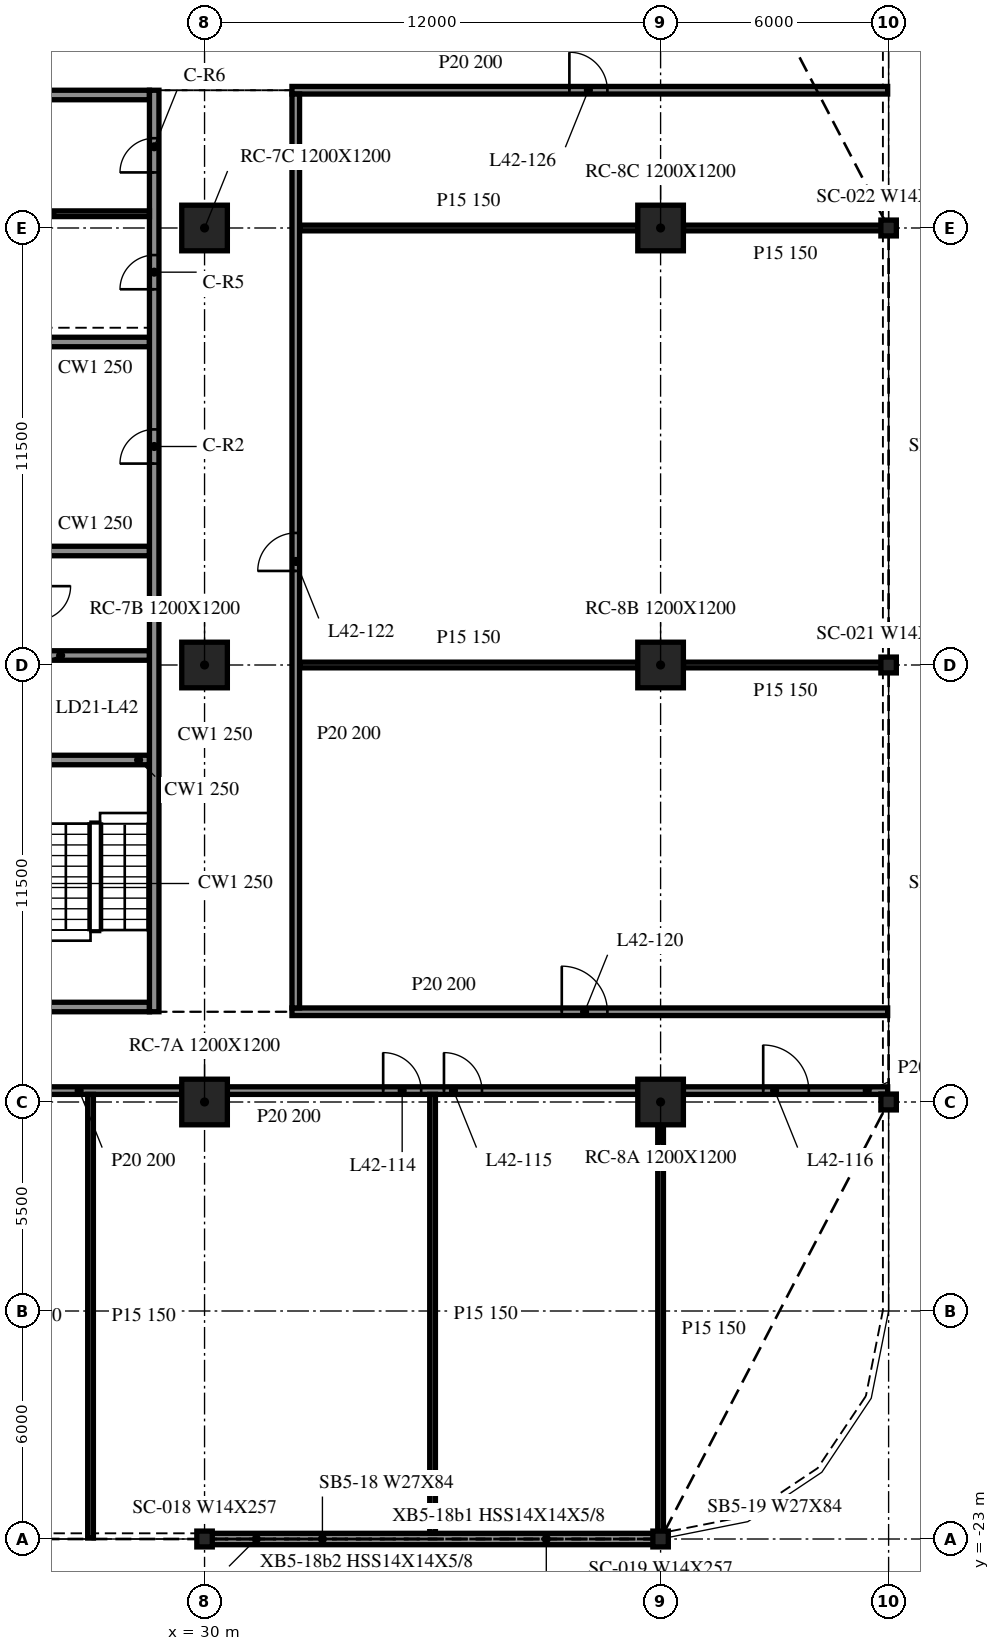
"""IFC4 building model, lengths in metres.
Left out: names, types, materials, properties, quantities, classifications, styles, units other than length and angle.
Written with IfcOpenShell. Run it as: python <this file> out.ifc"""

import sys

from ifc_helpers import new_model, si_unit, direction, frame, frame_2d, origin, origin_2d, place, context, subcontext, project, spatial, rectangle, i_section, extrude, element, fill, save


model = new_model("IFC4")
c1 = context("Model", 3, precision=1e-05, world=origin(), true_north=direction((0.0, 1.0)))
c2 = subcontext(c1, "Body", "Model", "MODEL_VIEW")
j1 = project(units=[si_unit("LENGTHUNIT", "METRE"), si_unit("PLANEANGLEUNIT", "RADIAN")], contexts=[c1])
p1 = place(None, origin())
s1 = spatial("IfcSite", under=j1, at=p1, CompositionType="ELEMENT")
p2 = place(p1, origin())
s2 = spatial("IfcBuilding", under=s1, at=p2, CompositionType="ELEMENT")
p3 = place(p2, frame((0.0, 0.0, 178.2)))
s3 = spatial("IfcBuildingStorey", under=s2, at=p3, CompositionType="ELEMENT", Elevation=178.2)
for number, where, z_axis, x_axis in (
    (1, (30.0, -11.5, -0.34), (0.0, 0.0, 1.0), (1.0, 0.0, 0.0)),
    (2, (30.0, 0.0, -0.34), (0.0, 0.0, 1.0), (1.0, 0.0, 0.0)),
    (3, (30.0, 11.5, -0.34), (0.0, 0.0, 1.0), (1.0, 0.0, 0.0)),
    (4, (42.0, -11.5, -0.34), (0.0, 0.0, 1.0), (1.0, 0.0, 0.0)),
    (5, (42.0, 0.0, -0.34), (0.0, 0.0, 1.0), (1.0, 0.0, 0.0)),
    (6, (42.0, 11.5, -0.34), (0.0, 0.0, 1.0), (1.0, 0.0, 0.0)),
):
    element("IfcColumn", number, at=place(p3, frame(where, z_axis=z_axis, x_axis=x_axis)), inside=s3, PredefinedType="COLUMN", context=c2, shape_type="SweptSolid", body=[
        extrude(rectangle(XDim=1.2, YDim=1.2, at=origin_2d()), origin(), (0.0, 0.0, 1.0), 3.8),
    ])
for number, where, z_axis, x_axis in (
    (7, (30.0, -23.0, -0.34), (0.0, 0.0, 1.0), (1.0, 0.0, 0.0)),
    (8, (42.0, -23.0, -0.34), (0.0, 0.0, 1.0), (1.0, 0.0, 0.0)),
    (9, (48.0, -11.5, -0.34), (0.0, 0.0, 1.0), (1.0, 0.0, 0.0)),
    (10, (48.0, 0.0, -0.34), (0.0, 0.0, 1.0), (1.0, 0.0, 0.0)),
    (11, (48.0, 11.5, -0.34), (0.0, 0.0, 1.0), (1.0, 0.0, 0.0)),
):
    element("IfcColumn", number, at=place(p3, frame(where, z_axis=z_axis, x_axis=x_axis)), inside=s3, PredefinedType="COLUMN", context=c2, shape_type="SweptSolid", body=[
        extrude(i_section(OverallWidth=0.406, OverallDepth=0.417, WebThickness=0.03, FlangeThickness=0.048, at=origin_2d()), origin(), (0.0, 0.0, 1.0), 3.8),
    ])
p4 = place(p3, frame((30.015, -23.0, 0.0), z_axis=(0.0, 0.0, 1.0), x_axis=(1.0, 0.0, 0.0)))
e12 = element("IfcWall", 12, at=p4, inside=s3, PredefinedType="NOTDEFINED", context=c2, shape_type="SweptSolid", body=[
    extrude(rectangle(XDim=11.97, YDim=0.3, at=frame_2d((5.985, 0.0))), origin(), (0.0, 0.0, 1.0), 2.782),
])
p5 = place(p3, frame((28.675, -9.125, 0.0), z_axis=(0.0, 0.0, 1.0), x_axis=(0.0, 1.0, 0.0)))
e13 = element("IfcWall", 13, at=p5, inside=s3, PredefinedType="SOLIDWALL", context=c2, shape_type="SweptSolid", body=[
    extrude(rectangle(XDim=24.25, YDim=0.25, at=frame_2d((12.125, 0.0))), origin(), (0.0, 0.0, 1.0), 3.46),
])
p6 = place(p5, frame((14.425, 0.0, 0.0)))
e14 = element("IfcOpeningElement", 14, at=p6, cuts=e13, PredefinedType="OPENING", context=c2, shape_type="SweptSolid", body=[
    extrude(rectangle(XDim=0.9, YDim=2.1, at=frame_2d((0.45, 1.05))), frame((0.0, 0.135, 0.0), z_axis=(0.0, -1.0, 0.0), x_axis=(1.0, 0.0, 0.0)), (0.0, 0.0, 1.0), 0.27),
])
p7 = place(p5, frame((19.012, 0.0, 0.0)))
e15 = element("IfcOpeningElement", 15, at=p7, cuts=e13, PredefinedType="OPENING", context=c2, shape_type="SweptSolid", body=[
    extrude(rectangle(XDim=0.9, YDim=2.1, at=frame_2d((0.45, 1.05))), frame((0.0, 0.135, 0.0), z_axis=(0.0, -1.0, 0.0), x_axis=(1.0, 0.0, 0.0)), (0.0, 0.0, 1.0), 0.27),
])
p8 = place(p5, frame((22.087, 0.0, 0.0)))
e16 = element("IfcOpeningElement", 16, at=p8, cuts=e13, PredefinedType="OPENING", context=c2, shape_type="SweptSolid", body=[
    extrude(rectangle(XDim=0.9, YDim=2.1, at=frame_2d((0.45, 1.05))), frame((0.0, 0.135, 0.0), z_axis=(0.0, -1.0, 0.0), x_axis=(1.0, 0.0, 0.0)), (0.0, 0.0, 1.0), 0.27),
])
p9 = place(p3, frame((28.55, -9.0, 0.0), z_axis=(0.0, 0.0, 1.0), x_axis=(-1.0, 0.0, 0.0)))
e17 = element("IfcWall", 17, at=p9, inside=s3, PredefinedType="SOLIDWALL", context=c2, shape_type="SweptSolid", body=[
    extrude(rectangle(XDim=9.1, YDim=0.25, at=frame_2d((4.55, 0.0))), origin(), (0.0, 0.0, 1.0), 3.46),
])
p10 = place(p9, frame((3.65, 0.0, 0.0)))
e18 = element("IfcOpeningElement", 18, at=p10, cuts=e17, PredefinedType="OPENING", context=c2, shape_type="SweptSolid", body=[
    extrude(rectangle(XDim=1.8, YDim=2.1, at=frame_2d((0.9, 1.05))), frame((0.0, 0.135, 0.0), z_axis=(0.0, -1.0, 0.0), x_axis=(1.0, 0.0, 0.0)), (0.0, 0.0, 1.0), 0.27),
])
p11 = place(p3, frame((19.45, 15.0, 0.0), z_axis=(0.0, 0.0, 1.0), x_axis=(1.0, 0.0, 0.0)))
e19 = element("IfcWall", 19, at=p11, inside=s3, PredefinedType="SOLIDWALL", context=c2, shape_type="SweptSolid", body=[
    extrude(rectangle(XDim=9.1, YDim=0.25, at=frame_2d((4.55, 0.0))), origin(), (0.0, 0.0, 1.0), 3.46),
])
p12 = place(p11, frame((3.65, 0.0, 0.0)))
e20 = element("IfcOpeningElement", 20, at=p12, cuts=e19, PredefinedType="OPENING", context=c2, shape_type="SweptSolid", body=[
    extrude(rectangle(XDim=1.8, YDim=2.1, at=frame_2d((0.9, 1.05))), frame((0.0, 0.135, 0.0), z_axis=(0.0, -1.0, 0.0), x_axis=(1.0, 0.0, 0.0)), (0.0, 0.0, 1.0), 0.27),
])
for number, where, z_axis, x_axis in (
    (21, (25.7, -2.5, 0.0), (0.0, 0.0, 1.0), (1.0, 0.0, 0.0)),
    (22, (25.7, 0.25, 0.0), (0.0, 0.0, 1.0), (1.0, 0.0, 0.0)),
    (23, (25.7, 3.0, 0.0), (0.0, 0.0, 1.0), (1.0, 0.0, 0.0)),
    (24, (25.7, 8.5, 0.0), (0.0, 0.0, 1.0), (1.0, 0.0, 0.0)),
):
    element("IfcWall", number, at=place(p3, frame(where, z_axis=z_axis, x_axis=x_axis)), inside=s3, PredefinedType="SOLIDWALL", context=c2, shape_type="SweptSolid", body=[
        extrude(rectangle(XDim=2.85, YDim=0.25, at=frame_2d((1.425, 0.0))), origin(), (0.0, 0.0, 1.0), 3.46),
    ])
p13 = place(p3, frame((25.7, 11.875, 0.0), z_axis=(0.0, 0.0, 1.0), x_axis=(1.0, 0.0, 0.0)))
e25 = element("IfcWall", 25, at=p13, inside=s3, PredefinedType="PARTITIONING", context=c2, shape_type="SweptSolid", body=[
    extrude(rectangle(XDim=2.85, YDim=0.15, at=frame_2d((1.425, 0.0))), origin(), (0.0, 0.0, 1.0), 3.46),
])
p14 = place(p3, frame((18.6, -11.2, 0.0), z_axis=(0.0, 0.0, 1.0), x_axis=(1.0, 0.0, 0.0)))
e26 = element("IfcWall", 26, at=p14, inside=s3, PredefinedType="PARTITIONING", context=c2, shape_type="SweptSolid", body=[
    extrude(rectangle(XDim=10.8, YDim=0.2, at=frame_2d((5.4, 0.0))), origin(), (0.0, 0.0, 1.0), 3.46),
])
p15 = place(p14, frame((3.9, 0.0, 0.0)))
e27 = element("IfcOpeningElement", 27, at=p15, cuts=e26, PredefinedType="OPENING", context=c2, shape_type="SweptSolid", body=[
    extrude(rectangle(XDim=1.2, YDim=2.1, at=frame_2d((0.6, 1.05))), frame((0.0, 0.11, 0.0), z_axis=(0.0, -1.0, 0.0), x_axis=(1.0, 0.0, 0.0)), (0.0, 0.0, 1.0), 0.22),
])
p16 = place(p14, frame((5.7, 0.0, 0.0)))
e28 = element("IfcOpeningElement", 28, at=p16, cuts=e26, PredefinedType="OPENING", context=c2, shape_type="SweptSolid", body=[
    extrude(rectangle(XDim=1.0, YDim=2.1, at=frame_2d((0.5, 1.05))), frame((0.0, 0.11, 0.0), z_axis=(0.0, -1.0, 0.0), x_axis=(1.0, 0.0, 0.0)), (0.0, 0.0, 1.0), 0.22),
])
p17 = place(p3, frame((30.6, -11.2, 0.0), z_axis=(0.0, 0.0, 1.0), x_axis=(1.0, 0.0, 0.0)))
e29 = element("IfcWall", 29, at=p17, inside=s3, PredefinedType="PARTITIONING", context=c2, shape_type="SweptSolid", body=[
    extrude(rectangle(XDim=10.8, YDim=0.2, at=frame_2d((5.4, 0.0))), origin(), (0.0, 0.0, 1.0), 3.46),
])
p18 = place(p17, frame((4.1, 0.0, 0.0)))
e30 = element("IfcOpeningElement", 30, at=p18, cuts=e29, PredefinedType="OPENING", context=c2, shape_type="SweptSolid", body=[
    extrude(rectangle(XDim=1.0, YDim=2.1, at=frame_2d((0.5, 1.05))), frame((0.0, 0.11, 0.0), z_axis=(0.0, -1.0, 0.0), x_axis=(1.0, 0.0, 0.0)), (0.0, 0.0, 1.0), 0.22),
])
p19 = place(p17, frame((5.7, 0.0, 0.0)))
e31 = element("IfcOpeningElement", 31, at=p19, cuts=e29, PredefinedType="OPENING", context=c2, shape_type="SweptSolid", body=[
    extrude(rectangle(XDim=1.0, YDim=2.1, at=frame_2d((0.5, 1.05))), frame((0.0, 0.11, 0.0), z_axis=(0.0, -1.0, 0.0), x_axis=(1.0, 0.0, 0.0)), (0.0, 0.0, 1.0), 0.22),
])
p20 = place(p3, frame((42.6, -11.2, 0.0), z_axis=(0.0, 0.0, 1.0), x_axis=(1.0, 0.0, 0.0)))
e32 = element("IfcWall", 32, at=p20, inside=s3, PredefinedType="PARTITIONING", context=c2, shape_type="SweptSolid", body=[
    extrude(rectangle(XDim=5.375, YDim=0.2, at=frame_2d((2.688, 0.0))), origin(), (0.0, 0.0, 1.0), 3.46),
])
p21 = place(p20, frame((2.1, 0.0, 0.0)))
e33 = element("IfcOpeningElement", 33, at=p21, cuts=e32, PredefinedType="OPENING", context=c2, shape_type="SweptSolid", body=[
    extrude(rectangle(XDim=1.2, YDim=2.1, at=frame_2d((0.6, 1.05))), frame((0.0, 0.11, 0.0), z_axis=(0.0, -1.0, 0.0), x_axis=(1.0, 0.0, 0.0)), (0.0, 0.0, 1.0), 0.22),
])
p22 = place(p3, frame((32.3, -9.125, 0.0), z_axis=(0.0, 0.0, 1.0), x_axis=(1.0, 0.0, 0.0)))
e34 = element("IfcWall", 34, at=p22, inside=s3, PredefinedType="PARTITIONING", context=c2, shape_type="SweptSolid", body=[
    extrude(rectangle(XDim=15.675, YDim=0.2, at=frame_2d((7.837, 0.0))), origin(), (0.0, 0.0, 1.0), 3.46),
])
p23 = place(p22, frame((7.1, 0.0, 0.0)))
e35 = element("IfcOpeningElement", 35, at=p23, cuts=e34, PredefinedType="OPENING", context=c2, shape_type="SweptSolid", body=[
    extrude(rectangle(XDim=1.2, YDim=2.1, at=frame_2d((0.6, 1.05))), frame((0.0, 0.11, 0.0), z_axis=(0.0, -1.0, 0.0), x_axis=(1.0, 0.0, 0.0)), (0.0, 0.0, 1.0), 0.22),
])
p24 = place(p3, frame((32.5, 0.0, 0.0), z_axis=(0.0, 0.0, 1.0), x_axis=(1.0, 0.0, 0.0)))
e36 = element("IfcWall", 36, at=p24, inside=s3, PredefinedType="PARTITIONING", context=c2, shape_type="SweptSolid", body=[
    extrude(rectangle(XDim=8.9, YDim=0.15, at=frame_2d((4.45, 0.0))), origin(), (0.0, 0.0, 1.0), 3.46),
])
p25 = place(p3, frame((42.6, 0.0, 0.0), z_axis=(0.0, 0.0, 1.0), x_axis=(1.0, 0.0, 0.0)))
e37 = element("IfcWall", 37, at=p25, inside=s3, PredefinedType="PARTITIONING", context=c2, shape_type="SweptSolid", body=[
    extrude(rectangle(XDim=5.375, YDim=0.15, at=frame_2d((2.688, 0.0))), origin(), (0.0, 0.0, 1.0), 3.46),
])
p26 = place(p3, frame((32.5, 11.5, 0.0), z_axis=(0.0, 0.0, 1.0), x_axis=(1.0, 0.0, 0.0)))
e38 = element("IfcWall", 38, at=p26, inside=s3, PredefinedType="PARTITIONING", context=c2, shape_type="SweptSolid", body=[
    extrude(rectangle(XDim=8.9, YDim=0.15, at=frame_2d((4.45, 0.0))), origin(), (0.0, 0.0, 1.0), 3.46),
])
p27 = place(p3, frame((42.6, 11.5, 0.0), z_axis=(0.0, 0.0, 1.0), x_axis=(1.0, 0.0, 0.0)))
e39 = element("IfcWall", 39, at=p27, inside=s3, PredefinedType="PARTITIONING", context=c2, shape_type="SweptSolid", body=[
    extrude(rectangle(XDim=5.375, YDim=0.15, at=frame_2d((2.688, 0.0))), origin(), (0.0, 0.0, 1.0), 3.46),
])
p28 = place(p3, frame((32.3, 15.125, 0.0), z_axis=(0.0, 0.0, 1.0), x_axis=(1.0, 0.0, 0.0)))
e40 = element("IfcWall", 40, at=p28, inside=s3, PredefinedType="PARTITIONING", context=c2, shape_type="SweptSolid", body=[
    extrude(rectangle(XDim=15.675, YDim=0.2, at=frame_2d((7.837, 0.0))), origin(), (0.0, 0.0, 1.0), 3.46),
])
p29 = place(p28, frame((7.3, 0.0, 0.0)))
e41 = element("IfcOpeningElement", 41, at=p29, cuts=e40, PredefinedType="OPENING", context=c2, shape_type="SweptSolid", body=[
    extrude(rectangle(XDim=1.0, YDim=2.1, at=frame_2d((0.5, 1.05))), frame((0.0, 0.11, 0.0), z_axis=(0.0, -1.0, 0.0), x_axis=(1.0, 0.0, 0.0)), (0.0, 0.0, 1.0), 0.22),
])
p30 = place(p3, frame((27.0, -22.975, 0.0), z_axis=(0.0, 0.0, 1.0), x_axis=(0.0, 1.0, 0.0)))
e42 = element("IfcWall", 42, at=p30, inside=s3, PredefinedType="PARTITIONING", context=c2, shape_type="SweptSolid", body=[
    extrude(rectangle(XDim=11.675, YDim=0.15, at=frame_2d((5.837, 0.0))), origin(), (0.0, 0.0, 1.0), 3.46),
])
p31 = place(p3, frame((32.4, -9.025, 0.0), z_axis=(0.0, 0.0, 1.0), x_axis=(0.0, 1.0, 0.0)))
e43 = element("IfcWall", 43, at=p31, inside=s3, PredefinedType="PARTITIONING", context=c2, shape_type="SweptSolid", body=[
    extrude(rectangle(XDim=24.05, YDim=0.2, at=frame_2d((12.025, 0.0))), origin(), (0.0, 0.0, 1.0), 3.46),
])
p32 = place(p31, frame((11.5, 0.0, 0.0)))
e44 = element("IfcOpeningElement", 44, at=p32, cuts=e43, PredefinedType="OPENING", context=c2, shape_type="SweptSolid", body=[
    extrude(rectangle(XDim=1.0, YDim=2.1, at=frame_2d((0.5, 1.05))), frame((0.0, 0.11, 0.0), z_axis=(0.0, -1.0, 0.0), x_axis=(1.0, 0.0, 0.0)), (0.0, 0.0, 1.0), 0.22),
])
p33 = place(p3, frame((36.0, -22.85, 0.0), z_axis=(0.0, 0.0, 1.0), x_axis=(0.0, 1.0, 0.0)))
e45 = element("IfcWall", 45, at=p33, inside=s3, PredefinedType="PARTITIONING", context=c2, shape_type="SweptSolid", body=[
    extrude(rectangle(XDim=11.55, YDim=0.15, at=frame_2d((5.775, 0.0))), origin(), (0.0, 0.0, 1.0), 3.46),
])
p34 = place(p3, frame((42.0, -22.847, 0.0), z_axis=(0.0, 0.0, 1.0), x_axis=(0.0, 1.0, 0.0)))
e46 = element("IfcWall", 46, at=p34, inside=s3, PredefinedType="PARTITIONING", context=c2, shape_type="SweptSolid", body=[
    extrude(rectangle(XDim=10.747, YDim=0.15, at=frame_2d((5.374, 0.0))), origin(), (0.0, 0.0, 1.0), 3.46),
])
p35 = place(p6, origin())
e47 = element("IfcDoor", 47, at=p35, inside=s3, OperationType="SINGLE_SWING_RIGHT", PredefinedType="DOOR", context=c2, shape_type="SweptSolid", body=[
    extrude(rectangle(XDim=0.9, YDim=2.1, at=frame_2d((0.45, 1.05))), frame((0.0, 0.025, 0.0), z_axis=(0.0, -1.0, 0.0), x_axis=(1.0, 0.0, 0.0)), (0.0, 0.0, 1.0), 0.05),
])
fill(e14, e47)
p36 = place(p7, origin())
e48 = element("IfcDoor", 48, at=p36, inside=s3, OperationType="SINGLE_SWING_LEFT", PredefinedType="DOOR", context=c2, shape_type="SweptSolid", body=[
    extrude(rectangle(XDim=0.9, YDim=2.1, at=frame_2d((0.45, 1.05))), frame((0.0, 0.025, 0.0), z_axis=(0.0, -1.0, 0.0), x_axis=(1.0, 0.0, 0.0)), (0.0, 0.0, 1.0), 0.05),
])
fill(e15, e48)
p37 = place(p8, origin())
e49 = element("IfcDoor", 49, at=p37, inside=s3, OperationType="SINGLE_SWING_RIGHT", PredefinedType="DOOR", context=c2, shape_type="SweptSolid", body=[
    extrude(rectangle(XDim=0.9, YDim=2.1, at=frame_2d((0.45, 1.05))), frame((0.0, 0.025, 0.0), z_axis=(0.0, -1.0, 0.0), x_axis=(1.0, 0.0, 0.0)), (0.0, 0.0, 1.0), 0.05),
])
fill(e16, e49)
p38 = place(p18, origin())
e50 = element("IfcDoor", 50, at=p38, inside=s3, OperationType="SINGLE_SWING_RIGHT", PredefinedType="DOOR", context=c2, shape_type="SweptSolid", body=[
    extrude(rectangle(XDim=1.0, YDim=2.1, at=frame_2d((0.5, 1.05))), frame((0.0, 0.025, 0.0), z_axis=(0.0, -1.0, 0.0), x_axis=(1.0, 0.0, 0.0)), (0.0, 0.0, 1.0), 0.05),
])
fill(e30, e50)
p39 = place(p19, origin())
e51 = element("IfcDoor", 51, at=p39, inside=s3, OperationType="SINGLE_SWING_LEFT", PredefinedType="DOOR", context=c2, shape_type="SweptSolid", body=[
    extrude(rectangle(XDim=1.0, YDim=2.1, at=frame_2d((0.5, 1.05))), frame((0.0, 0.025, 0.0), z_axis=(0.0, -1.0, 0.0), x_axis=(1.0, 0.0, 0.0)), (0.0, 0.0, 1.0), 0.05),
])
fill(e31, e51)
p40 = place(p21, origin())
e52 = element("IfcDoor", 52, at=p40, inside=s3, OperationType="SINGLE_SWING_LEFT", PredefinedType="DOOR", context=c2, shape_type="SweptSolid", body=[
    extrude(rectangle(XDim=1.2, YDim=2.1, at=frame_2d((0.6, 1.05))), frame((0.0, 0.025, 0.0), z_axis=(0.0, -1.0, 0.0), x_axis=(1.0, 0.0, 0.0)), (0.0, 0.0, 1.0), 0.05),
])
fill(e33, e52)
p41 = place(p23, origin())
e53 = element("IfcDoor", 53, at=p41, inside=s3, OperationType="SINGLE_SWING_LEFT", PredefinedType="DOOR", context=c2, shape_type="SweptSolid", body=[
    extrude(rectangle(XDim=1.2, YDim=2.1, at=frame_2d((0.6, 1.05))), frame((0.0, 0.025, 0.0), z_axis=(0.0, -1.0, 0.0), x_axis=(1.0, 0.0, 0.0)), (0.0, 0.0, 1.0), 0.05),
])
fill(e35, e53)
p42 = place(p32, origin())
e54 = element("IfcDoor", 54, at=p42, inside=s3, OperationType="SINGLE_SWING_RIGHT", PredefinedType="DOOR", context=c2, shape_type="SweptSolid", body=[
    extrude(rectangle(XDim=1.0, YDim=2.1, at=frame_2d((0.5, 1.05))), frame((0.0, 0.025, 0.0), z_axis=(0.0, -1.0, 0.0), x_axis=(1.0, 0.0, 0.0)), (0.0, 0.0, 1.0), 0.05),
])
fill(e44, e54)
p43 = place(p29, origin())
e55 = element("IfcDoor", 55, at=p43, inside=s3, OperationType="SINGLE_SWING_LEFT", PredefinedType="DOOR", context=c2, shape_type="SweptSolid", body=[
    extrude(rectangle(XDim=1.0, YDim=2.1, at=frame_2d((0.5, 1.05))), frame((0.0, 0.025, 0.0), z_axis=(0.0, -1.0, 0.0), x_axis=(1.0, 0.0, 0.0)), (0.0, 0.0, 1.0), 0.05),
])
fill(e41, e55)
save(model, sys.argv[1])
